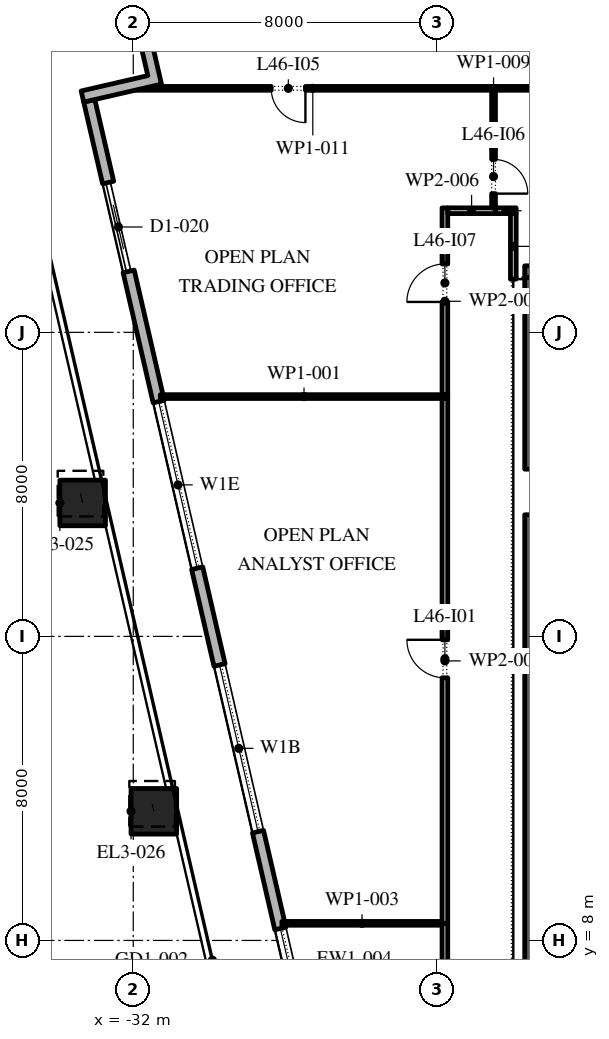
"""IFC4 building model, lengths in metres.
Left out: names, types, materials, properties, quantities, classifications, styles, units other than length and angle.
Written with IfcOpenShell. Run it as: python <this file> out.ifc"""

import sys

from ifc_helpers import new_model, si_unit, direction, frame, frame_2d, origin, origin_2d, place, context, subcontext, project, spatial, polyline, rectangle, outline, extrude, element, fill, save


model = new_model("IFC4")
c1 = context("Model", 3, precision=1e-05, world=origin(), true_north=direction((0.0, 1.0)))
c2 = subcontext(c1, "Body", "Model", "MODEL_VIEW")
j1 = project(units=[si_unit("LENGTHUNIT", "METRE"), si_unit("PLANEANGLEUNIT", "RADIAN")], contexts=[c1])
p1 = place(None, origin())
s1 = spatial("IfcSite", under=j1, at=p1, CompositionType="ELEMENT")
p2 = place(p1, origin())
s2 = spatial("IfcBuilding", under=s1, at=p2, CompositionType="ELEMENT")
p3 = place(p2, frame((0.0, 0.0, 209.4)))
s3 = spatial("IfcBuildingStorey", under=s2, at=p3, CompositionType="ELEMENT", Elevation=209.4)
p4 = place(p3, frame((-33.331, 19.511, 0.0), z_axis=(-0.013518985442, 0.058427546523, 0.998200109617), x_axis=(-0.974260583886, -0.225424742845, 0.0)))
e1 = element("IfcColumn", 1, at=p4, inside=s3, PredefinedType="COLUMN", context=c2, shape_type="SweptSolid", body=[
    extrude(rectangle(XDim=1.2, YDim=1.2, at=origin_2d()), origin(), (0.0, 0.0, 1.0), 4.208),
])
p5 = place(p3, frame((-31.458, 11.398, 0.0), z_axis=(-0.01079899337, 0.046737578833, 0.998848827635), x_axis=(-0.974329962248, -0.225124686929, 0.0)))
e2 = element("IfcColumn", 2, at=p5, inside=s3, PredefinedType="COLUMN", context=c2, shape_type="SweptSolid", body=[
    extrude(rectangle(XDim=1.2, YDim=1.2, at=origin_2d()), origin(), (0.0, 0.0, 1.0), 4.205),
])
p6 = place(p3, frame((-33.157, 30.092, 0.0), z_axis=(0.0, 0.0, 1.0), x_axis=(0.224950279389, -0.974370243697, 0.0)))
e3 = element("IfcWall", 3, at=p6, inside=s3, PredefinedType="STANDARD", context=c2, shape_type="SweptSolid", body=[
    extrude(rectangle(XDim=49.5, YDim=0.3, at=frame_2d((24.75, 0.0))), origin(), (0.0, 0.0, 1.0), 4.0),
])
p7 = place(p6, frame((2.207, 0.0, 0.0)))
e4 = element("IfcOpeningElement", 4, at=p7, cuts=e3, PredefinedType="OPENING", context=c2, shape_type="SweptSolid", body=[
    extrude(rectangle(XDim=2.4, YDim=3.5, at=frame_2d((1.2, 1.75))), frame((0.0, 0.16, 0.0), z_axis=(0.0, -1.0, 0.0), x_axis=(1.0, 0.0, 0.0)), (0.0, 0.0, 1.0), 0.32),
])
p8 = place(p6, frame((8.121, 0.0, 0.45)))
e5 = element("IfcOpeningElement", 5, at=p8, cuts=e3, PredefinedType="OPENING", context=c2, shape_type="SweptSolid", body=[
    extrude(rectangle(XDim=4.5, YDim=2.825, at=frame_2d((2.25, 1.413))), frame((0.0, 0.16, 0.0), z_axis=(0.0, -1.0, 0.0), x_axis=(1.0, 0.0, 0.0)), (0.0, 0.0, 1.0), 0.32),
])
p9 = place(p6, frame((15.236, 0.0, 0.45)))
e6 = element("IfcOpeningElement", 6, at=p9, cuts=e3, PredefinedType="OPENING", context=c2, shape_type="SweptSolid", body=[
    extrude(rectangle(XDim=4.5, YDim=2.95, at=frame_2d((2.25, 1.475))), frame((0.0, 0.16, 0.0), z_axis=(0.0, -1.0, 0.0), x_axis=(1.0, 0.0, 0.0)), (0.0, 0.0, 1.0), 0.32),
])
p10 = place(p6, frame((22.35, 0.0, 0.45)))
e7 = element("IfcOpeningElement", 7, at=p10, cuts=e3, PredefinedType="OPENING", context=c2, shape_type="SweptSolid", body=[
    extrude(rectangle(XDim=4.5, YDim=3.0, at=frame_2d((2.25, 1.5))), frame((0.0, 0.16, 0.0), z_axis=(0.0, -1.0, 0.0), x_axis=(1.0, 0.0, 0.0)), (0.0, 0.0, 1.0), 0.32),
])
p11 = place(p6, frame((30.514, 0.0, 0.0)))
e8 = element("IfcOpeningElement", 8, at=p11, cuts=e3, PredefinedType="OPENING", context=c2, shape_type="SweptSolid", body=[
    extrude(rectangle(XDim=2.4, YDim=3.5, at=frame_2d((1.2, 1.75))), frame((0.0, 0.16, 0.0), z_axis=(0.0, -1.0, 0.0), x_axis=(1.0, 0.0, 0.0)), (0.0, 0.0, 1.0), 0.32),
])
p12 = place(p6, frame((36.579, 0.0, 0.45)))
e9 = element("IfcOpeningElement", 9, at=p12, cuts=e3, PredefinedType="OPENING", context=c2, shape_type="SweptSolid", body=[
    extrude(rectangle(XDim=4.5, YDim=3.05, at=frame_2d((2.25, 1.525))), frame((0.0, 0.16, 0.0), z_axis=(0.0, -1.0, 0.0), x_axis=(1.0, 0.0, 0.0)), (0.0, 0.0, 1.0), 0.32),
])
p13 = place(p6, frame((43.693, 0.0, 0.45)))
e10 = element("IfcOpeningElement", 10, at=p13, cuts=e3, PredefinedType="OPENING", context=c2, shape_type="SweptSolid", body=[
    extrude(rectangle(XDim=4.5, YDim=3.05, at=frame_2d((2.25, 1.525))), frame((0.0, 0.16, 0.0), z_axis=(0.0, -1.0, 0.0), x_axis=(1.0, 0.0, 0.0)), (0.0, 0.0, 1.0), 0.32),
])
p14 = place(p3, origin())
e11 = element("IfcWall", 11, at=p14, inside=s3, PredefinedType="STANDARD", context=c2, shape_type="SweptSolid", body=[
    extrude(outline(polyline([(-31.617, 30.756), (-32.022, 32.51), (-30.268, 32.914), (-30.605, 34.376), (-30.313, 34.443), (-29.908, 32.69), (-31.662, 32.285), (-31.257, 30.531), (-33.303, 30.058), (-33.371, 30.351), (-31.617, 30.756)])), origin(), (0.0, 0.0, 1.0), 4.0),
])
p15 = place(p3, frame((-21.35, -2.45, 0.0), z_axis=(0.0, 0.0, 1.0), x_axis=(0.0, 1.0, 0.0)))
e12 = element("IfcWall", 12, at=p15, inside=s3, PredefinedType="SHEAR", context=c2, shape_type="SweptSolid", body=[
    extrude(rectangle(XDim=27.9, YDim=0.7, at=frame_2d((13.95, 0.0))), origin(), (0.0, 0.0, 1.0), 4.0),
])
p16 = place(p15, frame((5.05, 0.0, 0.0)))
e13 = element("IfcOpeningElement", 13, at=p16, cuts=e12, PredefinedType="OPENING", context=c2, shape_type="SweptSolid", body=[
    extrude(rectangle(XDim=1.2, YDim=2.1, at=frame_2d((0.6, 1.05))), frame((0.0, 0.36, 0.0), z_axis=(0.0, -1.0, 0.0), x_axis=(1.0, 0.0, 0.0)), (0.0, 0.0, 1.0), 0.72),
])
p17 = place(p15, frame((21.65, 0.0, 0.0)))
e14 = element("IfcOpeningElement", 14, at=p17, cuts=e12, PredefinedType="OPENING", context=c2, shape_type="SweptSolid", body=[
    extrude(rectangle(XDim=1.2, YDim=2.1, at=frame_2d((0.6, 1.05))), frame((0.0, 0.36, 0.0), z_axis=(0.0, -1.0, 0.0), x_axis=(1.0, 0.0, 0.0)), (0.0, 0.0, 1.0), 0.72),
])
p18 = place(p3, frame((-21.7, 25.6, 0.0), z_axis=(0.0, 0.0, 1.0), x_axis=(1.0, 0.0, 0.0)))
e15 = element("IfcWall", 15, at=p18, inside=s3, PredefinedType="SHEAR", context=c2, shape_type="SweptSolid", body=[
    extrude(rectangle(XDim=11.4, YDim=0.3, at=frame_2d((5.7, 0.0))), origin(), (0.0, 0.0, 1.0), 4.0),
])
p19 = place(p3, frame((-31.289, 22.31, 0.0), z_axis=(0.0, 0.0, 1.0), x_axis=(1.0, 0.0, 0.0)))
e16 = element("IfcWall", 16, at=p19, inside=s3, PredefinedType="PARTITIONING", context=c2, shape_type="SweptSolid", body=[
    extrude(rectangle(XDim=7.564, YDim=0.1, at=frame_2d((3.782, 0.0))), origin(), (0.0, 0.0, 1.0), 4.0),
])
p20 = place(p3, frame((-23.8, -5.075, 0.0), z_axis=(0.0, 0.0, 1.0), x_axis=(0.0, 1.0, 0.0)))
e17 = element("IfcWall", 17, at=p20, inside=s3, PredefinedType="PARTITIONING", context=c2, shape_type="SweptSolid", body=[
    extrude(rectangle(XDim=13.525, YDim=0.15, at=frame_2d((6.762, 0.0))), origin(), (0.0, 0.0, 1.0), 4.0),
])
p21 = place(p20, frame((7.625, 0.0, 0.0)))
e18 = element("IfcOpeningElement", 18, at=p21, cuts=e17, PredefinedType="OPENING", context=c2, shape_type="SweptSolid", body=[
    extrude(rectangle(XDim=1.0, YDim=2.1, at=frame_2d((0.5, 1.05))), frame((0.0, 0.085, 0.0), z_axis=(0.0, -1.0, 0.0), x_axis=(1.0, 0.0, 0.0)), (0.0, 0.0, 1.0), 0.17),
])
p22 = place(p3, frame((-23.875, 8.45, 0.0), z_axis=(0.0, 0.0, 1.0), x_axis=(-1.0, 0.0, 0.0)))
e19 = element("IfcWall", 19, at=p22, inside=s3, PredefinedType="PARTITIONING", context=c2, shape_type="SweptSolid", body=[
    extrude(rectangle(XDim=4.214, YDim=0.1, at=frame_2d((2.107, 0.0))), origin(), (0.0, 0.0, 1.0), 4.0),
])
p23 = place(p3, frame((-23.8, 8.45, 0.0), z_axis=(0.0, 0.0, 1.0), x_axis=(0.0, 1.0, 0.0)))
e20 = element("IfcWall", 20, at=p23, inside=s3, PredefinedType="PARTITIONING", context=c2, shape_type="SweptSolid", body=[
    extrude(rectangle(XDim=13.81, YDim=0.15, at=frame_2d((6.905, 0.0))), origin(), (0.0, 0.0, 1.0), 4.0),
])
p24 = place(p23, frame((6.46, 0.0, 0.0)))
e21 = element("IfcOpeningElement", 21, at=p24, cuts=e20, PredefinedType="OPENING", context=c2, shape_type="SweptSolid", body=[
    extrude(rectangle(XDim=1.0, YDim=2.1, at=frame_2d((0.5, 1.05))), frame((0.0, 0.085, 0.0), z_axis=(0.0, -1.0, 0.0), x_axis=(1.0, 0.0, 0.0)), (0.0, 0.0, 1.0), 0.17),
])
p25 = place(p3, frame((-23.8, 22.36, 0.0), z_axis=(0.0, 0.0, 1.0), x_axis=(0.0, 1.0, 0.0)))
e22 = element("IfcWall", 22, at=p25, inside=s3, PredefinedType="PARTITIONING", context=c2, shape_type="SweptSolid", body=[
    extrude(rectangle(XDim=4.915, YDim=0.15, at=frame_2d((2.458, 0.0))), origin(), (0.0, 0.0, 1.0), 4.0),
])
p26 = place(p25, frame((2.44, 0.0, 0.0)))
e23 = element("IfcOpeningElement", 23, at=p26, cuts=e22, PredefinedType="OPENING", context=c2, shape_type="SweptSolid", body=[
    extrude(rectangle(XDim=1.0, YDim=2.1, at=frame_2d((0.5, 1.05))), frame((0.0, 0.085, 0.0), z_axis=(0.0, -1.0, 0.0), x_axis=(1.0, 0.0, 0.0)), (0.0, 0.0, 1.0), 0.17),
])
p27 = place(p3, frame((-23.725, 27.2, 0.0), z_axis=(0.0, 0.0, 1.0), x_axis=(1.0, 0.0, 0.0)))
e24 = element("IfcWall", 24, at=p27, inside=s3, PredefinedType="PARTITIONING", context=c2, shape_type="SweptSolid", body=[
    extrude(rectangle(XDim=1.255, YDim=0.15, at=frame_2d((0.627, 0.0))), origin(), (0.0, 0.0, 1.0), 4.0),
])
p28 = place(p3, frame((-22.52, 27.275, 0.0), z_axis=(0.0, 0.0, 1.0), x_axis=(0.0, 1.0, 0.0)))
e25 = element("IfcWall", 25, at=p28, inside=s3, PredefinedType="PARTITIONING", context=c2, shape_type="SweptSolid", body=[
    extrude(rectangle(XDim=3.195, YDim=0.1, at=frame_2d((1.598, 0.0))), origin(), (0.0, 0.0, 1.0), 4.0),
])
p29 = place(p28, frame((0.375, 0.0, 0.0)))
e26 = element("IfcOpeningElement", 26, at=p29, cuts=e25, PredefinedType="OPENING", context=c2, shape_type="SweptSolid", body=[
    extrude(rectangle(XDim=0.9, YDim=2.1, at=frame_2d((0.45, 1.05))), frame((0.0, 0.06, 0.0), z_axis=(0.0, -1.0, 0.0), x_axis=(1.0, 0.0, 0.0)), (0.0, 0.0, 1.0), 0.12),
])
p30 = place(p3, frame((-22.47, 27.2, 0.0), z_axis=(0.0, 0.0, 1.0), x_axis=(1.0, 0.0, 0.0)))
e27 = element("IfcWall", 27, at=p30, inside=s3, PredefinedType="PARTITIONING", context=c2, shape_type="SweptSolid", body=[
    extrude(rectangle(XDim=0.545, YDim=0.15, at=frame_2d((0.272, 0.0))), origin(), (0.0, 0.0, 1.0), 4.0),
])
p31 = place(p3, frame((-22.57, 30.42, 0.0), z_axis=(0.0, 0.0, 1.0), x_axis=(-1.0, 0.0, 0.0)))
e28 = element("IfcWall", 28, at=p31, inside=s3, PredefinedType="PARTITIONING", context=c2, shape_type="SweptSolid", body=[
    extrude(rectangle(XDim=9.412, YDim=0.1, at=frame_2d((4.706, 0.0))), origin(), (0.0, 0.0, 1.0), 4.0),
])
p32 = place(p31, frame((4.9, 0.0, 0.0)))
e29 = element("IfcOpeningElement", 29, at=p32, cuts=e28, PredefinedType="OPENING", context=c2, shape_type="SweptSolid", body=[
    extrude(rectangle(XDim=0.9, YDim=2.1, at=frame_2d((0.45, 1.05))), frame((0.0, 0.06, 0.0), z_axis=(0.0, -1.0, 0.0), x_axis=(1.0, 0.0, 0.0)), (0.0, 0.0, 1.0), 0.12),
])
p33 = place(p3, frame((-22.0, 27.125, 0.0), z_axis=(0.0, 0.0, 1.0), x_axis=(0.0, -1.0, 0.0)))
e30 = element("IfcWall", 30, at=p33, inside=s3, PredefinedType="PARTITIONING", context=c2, shape_type="SweptSolid", body=[
    extrude(rectangle(XDim=1.725, YDim=0.15, at=frame_2d((0.863, 0.0))), origin(), (0.0, 0.0, 1.0), 4.0),
])
p34 = place(p3, frame((-9.88, 30.42, 0.0), z_axis=(0.0, 0.0, 1.0), x_axis=(-1.0, 0.0, 0.0)))
e31 = element("IfcWall", 31, at=p34, inside=s3, PredefinedType="PARTITIONING", context=c2, shape_type="SweptSolid", body=[
    extrude(rectangle(XDim=12.59, YDim=0.1, at=frame_2d((6.295, 0.0))), origin(), (0.0, 0.0, 1.0), 4.0),
])
p35 = place(p7, origin())
e32 = element("IfcDoor", 32, at=p35, inside=s3, OperationType="DOUBLE_DOOR_SLIDING", PredefinedType="DOOR", context=c2, shape_type="SweptSolid", body=[
    extrude(rectangle(XDim=2.4, YDim=3.5, at=frame_2d((1.2, 1.75))), frame((0.0, 0.025, 0.0), z_axis=(0.0, -1.0, 0.0), x_axis=(1.0, 0.0, 0.0)), (0.0, 0.0, 1.0), 0.05),
])
fill(e4, e32)
p36 = place(p8, origin())
e33 = element("IfcWindow", 33, at=p36, inside=s3, PartitioningType="DOUBLE_PANEL_VERTICAL", PredefinedType="WINDOW", context=c2, shape_type="SweptSolid", body=[
    extrude(rectangle(XDim=4.5, YDim=2.825, at=frame_2d((2.25, 1.413))), frame((0.0, 0.03, 0.0), z_axis=(0.0, -1.0, 0.0), x_axis=(1.0, 0.0, 0.0)), (0.0, 0.0, 1.0), 0.06),
])
fill(e5, e33)
p37 = place(p9, origin())
e34 = element("IfcWindow", 34, at=p37, inside=s3, PartitioningType="DOUBLE_PANEL_VERTICAL", PredefinedType="WINDOW", context=c2, shape_type="SweptSolid", body=[
    extrude(rectangle(XDim=4.5, YDim=2.95, at=frame_2d((2.25, 1.475))), frame((0.0, 0.03, 0.0), z_axis=(0.0, -1.0, 0.0), x_axis=(1.0, 0.0, 0.0)), (0.0, 0.0, 1.0), 0.06),
])
fill(e6, e34)
p38 = place(p10, origin())
e35 = element("IfcWindow", 35, at=p38, inside=s3, PartitioningType="DOUBLE_PANEL_VERTICAL", PredefinedType="WINDOW", context=c2, shape_type="SweptSolid", body=[
    extrude(rectangle(XDim=4.5, YDim=3.0, at=frame_2d((2.25, 1.5))), frame((0.0, 0.03, 0.0), z_axis=(0.0, -1.0, 0.0), x_axis=(1.0, 0.0, 0.0)), (0.0, 0.0, 1.0), 0.06),
])
fill(e7, e35)
p39 = place(p24, origin())
e36 = element("IfcDoor", 36, at=p39, inside=s3, OperationType="SINGLE_SWING_LEFT", PredefinedType="DOOR", context=c2, shape_type="SweptSolid", body=[
    extrude(rectangle(XDim=1.0, YDim=2.1, at=frame_2d((0.5, 1.05))), frame((0.0, 0.025, 0.0), z_axis=(0.0, -1.0, 0.0), x_axis=(1.0, 0.0, 0.0)), (0.0, 0.0, 1.0), 0.05),
])
fill(e21, e36)
p40 = place(p32, origin())
e37 = element("IfcDoor", 37, at=p40, inside=s3, OperationType="SINGLE_SWING_RIGHT", PredefinedType="DOOR", context=c2, shape_type="SweptSolid", body=[
    extrude(rectangle(XDim=0.9, YDim=2.1, at=frame_2d((0.45, 1.05))), frame((0.0, 0.025, 0.0), z_axis=(0.0, -1.0, 0.0), x_axis=(1.0, 0.0, 0.0)), (0.0, 0.0, 1.0), 0.05),
])
fill(e29, e37)
p41 = place(p29, frame((0.9, 0.0, 0.0), z_axis=(0.0, 0.0, 1.0), x_axis=(-1.0, 0.0, 0.0)))
e38 = element("IfcDoor", 38, at=p41, inside=s3, OperationType="SINGLE_SWING_LEFT", PredefinedType="DOOR", context=c2, shape_type="SweptSolid", body=[
    extrude(rectangle(XDim=0.9, YDim=2.1, at=frame_2d((0.45, 1.05))), frame((0.0, 0.025, 0.0), z_axis=(0.0, -1.0, 0.0), x_axis=(1.0, 0.0, 0.0)), (0.0, 0.0, 1.0), 0.05),
])
fill(e26, e38)
p42 = place(p26, origin())
e39 = element("IfcDoor", 39, at=p42, inside=s3, OperationType="SINGLE_SWING_RIGHT", PredefinedType="DOOR", context=c2, shape_type="SweptSolid", body=[
    extrude(rectangle(XDim=1.0, YDim=2.1, at=frame_2d((0.5, 1.05))), frame((0.0, 0.025, 0.0), z_axis=(0.0, -1.0, 0.0), x_axis=(1.0, 0.0, 0.0)), (0.0, 0.0, 1.0), 0.05),
])
fill(e23, e39)
save(model, sys.argv[1])
